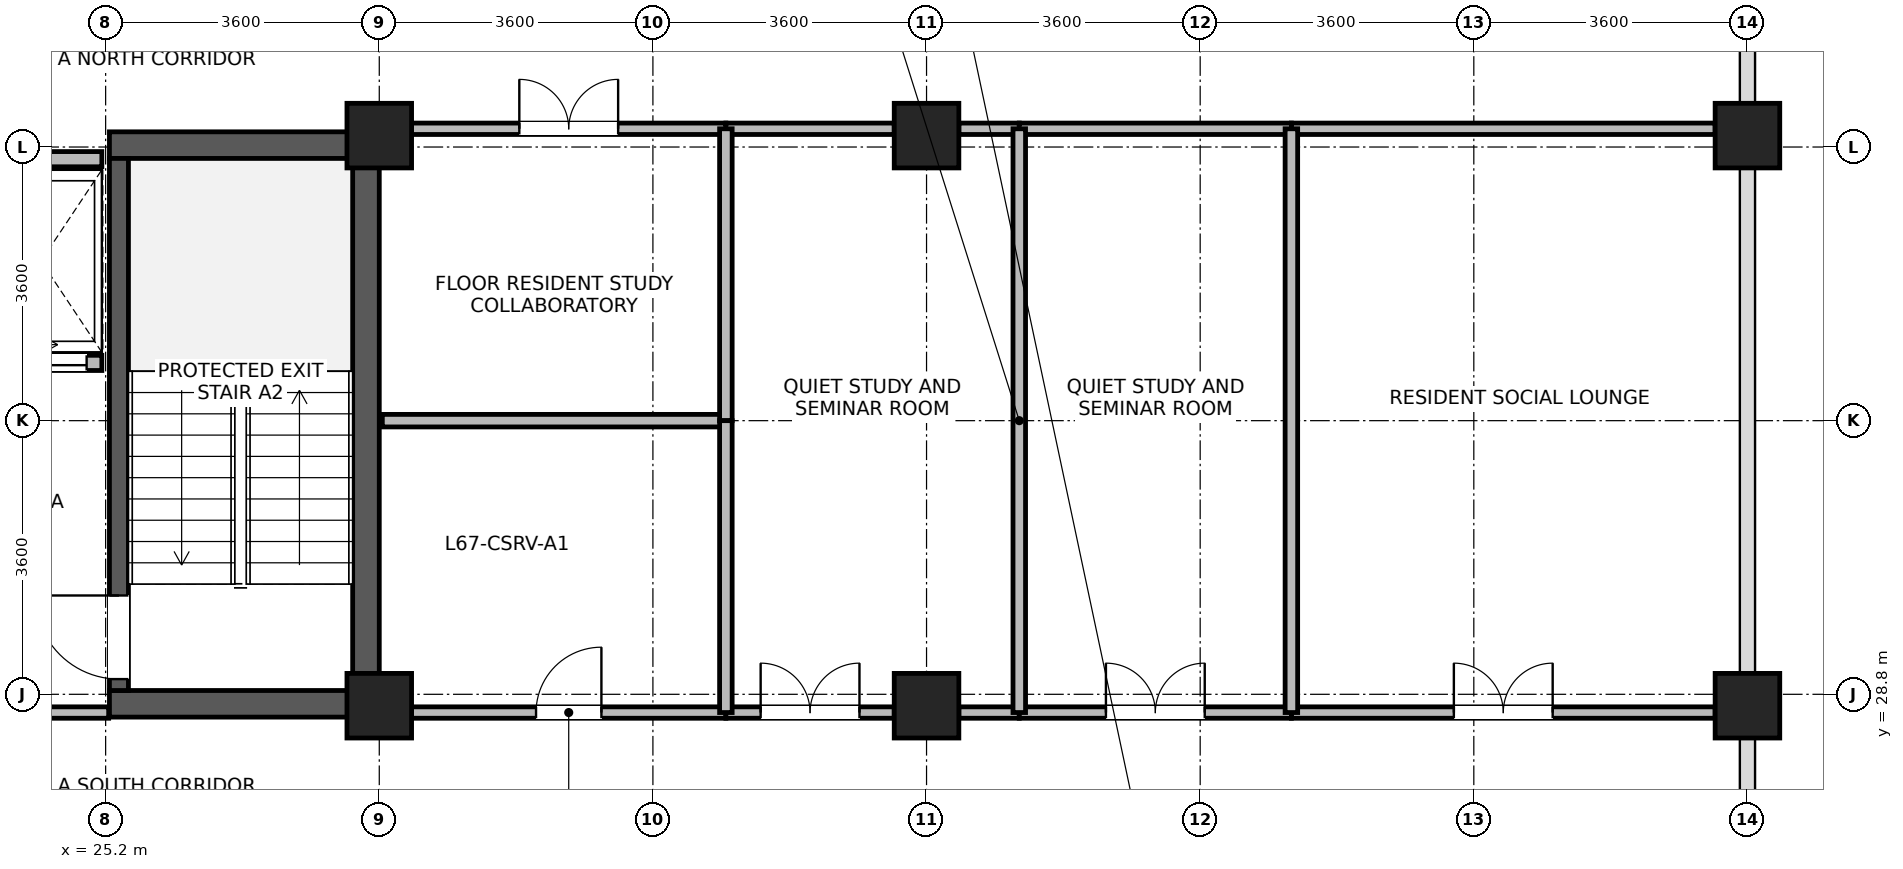
"""IFC4 building model, lengths in metres.
Left out: names, types, materials, properties, quantities, classifications, styles, units other than length and angle.
Written with IfcOpenShell. Run it as: python <this file> out.ifc"""

import sys

from ifc_helpers import new_model, si_unit, direction, frame, frame_2d, origin, origin_2d, place, context, subcontext, project, spatial, rectangle, extrude, source, transform, mapped, element, fill, save


model = new_model("IFC4")
c1 = context("Model", 3, precision=1e-05, world=origin(), true_north=direction((0.0, 1.0)))
c2 = subcontext(c1, "Body", "Model", "MODEL_VIEW")
j1 = project(units=[si_unit("LENGTHUNIT", "METRE"), si_unit("PLANEANGLEUNIT", "RADIAN")], contexts=[c1])
p1 = place(None, origin())
s1 = spatial("IfcSite", under=j1, at=p1, CompositionType="ELEMENT")
p2 = place(p1, origin())
s2 = spatial("IfcBuilding", under=s1, at=p2, CompositionType="ELEMENT")
p3 = place(p2, frame((0.0, 0.0, 261.0)))
s3 = spatial("IfcBuildingStorey", under=s2, at=p3, CompositionType="ELEMENT", Elevation=261.0)
p4 = place(p3, frame((28.625, 28.5, 0.0), z_axis=(0.0, 0.0, 1.0), x_axis=(0.0, 1.0, 0.0)))
e1 = element("IfcWall", 1, at=p4, inside=s3, PredefinedType="SHEAR", context=c2, shape_type="SweptSolid", body=[
    extrude(rectangle(XDim=7.7, YDim=0.35, at=frame_2d((3.85, 0.0))), origin(), (0.0, 0.0, 1.0), 3.475),
])
for number, where, z_axis, x_axis in (
    (2, (25.25, 28.675, 0.0), (0.0, 0.0, 1.0), (1.0, 0.0, 0.0)),
    (3, (25.25, 36.025, 0.0), (0.0, 0.0, 1.0), (1.0, 0.0, 0.0)),
):
    element("IfcWall", number, at=place(p3, frame(where, z_axis=z_axis, x_axis=x_axis)), inside=s3, PredefinedType="SHEAR", context=c2, shape_type="SweptSolid", body=[
        extrude(rectangle(XDim=3.2, YDim=0.35, at=frame_2d((1.6, 0.0))), origin(), (0.0, 0.0, 1.0), 3.475),
    ])
p5 = place(p3, frame((25.375, 28.85, 0.0), z_axis=(0.0, 0.0, 1.0), x_axis=(0.0, 1.0, 0.0)))
e4 = element("IfcWall", 4, at=p5, inside=s3, PredefinedType="SHEAR", context=c2, shape_type="SweptSolid", body=[
    extrude(rectangle(XDim=7.0, YDim=0.25, at=frame_2d((3.5, 0.0))), origin(), (0.0, 0.0, 1.0), 3.475),
])
p6 = place(p5, frame((0.15, 0.0, 0.0)))
e5 = element("IfcOpeningElement", 5, at=p6, cuts=e4, PredefinedType="OPENING", context=c2, shape_type="SweptSolid", body=[
    extrude(rectangle(XDim=1.1, YDim=2.08, at=frame_2d((0.55, 1.04))), frame((0.0, 0.135, 0.0), z_axis=(0.0, -1.0, 0.0), x_axis=(1.0, 0.0, 0.0)), (0.0, 0.0, 1.0), 0.27),
])
m1 = source(origin(), c2, "Body", "SweptSolid", [
    extrude(rectangle(XDim=0.85, YDim=0.85, at=origin_2d()), origin(), (0.0, 0.0, 1.0), 3.7),
])
for number, where, z_axis, x_axis in (
    (6, (28.8, 28.65, 0.0), (0.0, 0.0, 1.0), (1.0, 0.0, 0.0)),
    (7, (28.8, 36.15, 0.0), (0.0, 0.0, 1.0), (1.0, 0.0, 0.0)),
    (8, (36.0, 28.65, 0.0), (0.0, 0.0, 1.0), (1.0, 0.0, 0.0)),
    (9, (36.0, 36.15, 0.0), (0.0, 0.0, 1.0), (1.0, 0.0, 0.0)),
    (10, (46.8, 28.65, 0.0), (0.0, 0.0, 1.0), (1.0, 0.0, 0.0)),
    (11, (46.8, 36.15, 0.0), (0.0, 0.0, 1.0), (1.0, 0.0, 0.0)),
):
    element("IfcColumn", number, at=place(p3, frame(where, z_axis=z_axis, x_axis=x_axis)), inside=s3, PredefinedType="COLUMN", context=c2, shape_type="MappedRepresentation", body=[
        mapped(m1, transform((0.0, 0.0, 0.0), x_axis=(1.0, 0.0, 0.0), y_axis=(0.0, 1.0, 0.0), z_axis=(0.0, 0.0, 1.0), scale=1.0)),
    ])
p7 = place(p3, frame((23.55, 33.16, 0.0), z_axis=(0.0, 0.0, 1.0), x_axis=(1.0, 0.0, 0.0)))
e12 = element("IfcWall", 12, at=p7, inside=s3, PredefinedType="PARTITIONING", context=c2, shape_type="SweptSolid", body=[
    extrude(rectangle(XDim=1.6, YDim=0.2, at=frame_2d((0.8, 0.0))), origin(), (0.0, 0.0, 1.0), 3.455),
])
p8 = place(p7, frame((0.2, 0.0, 0.0)))
e13 = element("IfcOpeningElement", 13, at=p8, cuts=e12, PredefinedType="OPENING", context=c2, shape_type="SweptSolid", body=[
    extrude(rectangle(XDim=1.2, YDim=2.12, at=frame_2d((0.6, 1.06))), frame((0.0, 0.11, 0.0), z_axis=(0.0, -1.0, 0.0), x_axis=(1.0, 0.0, 0.0)), (0.0, 0.0, 1.0), 0.22),
])
p9 = place(p3, frame((23.55, 35.84, 0.0), z_axis=(0.0, 0.0, 1.0), x_axis=(1.0, 0.0, 0.0)))
e14 = element("IfcWall", 14, at=p9, inside=s3, PredefinedType="PARTITIONING", context=c2, shape_type="SweptSolid", body=[
    extrude(rectangle(XDim=1.6, YDim=0.2, at=frame_2d((0.8, 0.0))), origin(), (0.0, 0.0, 1.0), 2.555),
])
p10 = place(p3, frame((40.8, 28.56, 0.0), z_axis=(0.0, 0.0, 1.0), x_axis=(1.0, 0.0, 0.0)))
e15 = element("IfcWall", 15, at=p10, inside=s3, PredefinedType="PARTITIONING", context=c2, shape_type="SweptSolid", body=[
    extrude(rectangle(XDim=5.575, YDim=0.15, at=frame_2d((2.788, 0.0))), origin(), (0.0, 0.0, 1.0), 2.905),
])
p11 = place(p10, frame((2.137, 0.0, 0.0)))
e16 = element("IfcOpeningElement", 16, at=p11, cuts=e15, PredefinedType="OPENING", context=c2, shape_type="SweptSolid", body=[
    extrude(rectangle(XDim=1.3, YDim=2.12, at=frame_2d((0.65, 1.06))), frame((0.0, 0.085, 0.0), z_axis=(0.0, -1.0, 0.0), x_axis=(1.0, 0.0, 0.0)), (0.0, 0.0, 1.0), 0.17),
])
p12 = place(p3, frame((40.8, 36.24, 0.0), z_axis=(0.0, 0.0, 1.0), x_axis=(1.0, 0.0, 0.0)))
e17 = element("IfcWall", 17, at=p12, inside=s3, PredefinedType="PARTITIONING", context=c2, shape_type="SweptSolid", body=[
    extrude(rectangle(XDim=5.575, YDim=0.15, at=frame_2d((2.788, 0.0))), origin(), (0.0, 0.0, 1.0), 2.905),
])
p13 = place(p3, frame((29.225, 28.56, 0.0), z_axis=(0.0, 0.0, 1.0), x_axis=(1.0, 0.0, 0.0)))
e18 = element("IfcWall", 18, at=p13, inside=s3, PredefinedType="PARTITIONING", context=c2, shape_type="SweptSolid", body=[
    extrude(rectangle(XDim=4.135, YDim=0.15, at=frame_2d((2.067, 0.0))), origin(), (0.0, 0.0, 1.0), 2.905),
])
p14 = place(p13, frame((1.637, 0.0, 0.0)))
e19 = element("IfcOpeningElement", 19, at=p14, cuts=e18, PredefinedType="OPENING", context=c2, shape_type="SweptSolid", body=[
    extrude(rectangle(XDim=0.86, YDim=2.02, at=frame_2d((0.43, 1.01))), frame((0.0, 0.085, 0.0), z_axis=(0.0, -1.0, 0.0), x_axis=(1.0, 0.0, 0.0)), (0.0, 0.0, 1.0), 0.17),
])
p15 = place(p3, frame((29.225, 36.24, 0.0), z_axis=(0.0, 0.0, 1.0), x_axis=(1.0, 0.0, 0.0)))
e20 = element("IfcWall", 20, at=p15, inside=s3, PredefinedType="PARTITIONING", context=c2, shape_type="SweptSolid", body=[
    extrude(rectangle(XDim=4.135, YDim=0.15, at=frame_2d((2.067, 0.0))), origin(), (0.0, 0.0, 1.0), 2.905),
])
p16 = place(p15, frame((1.417, 0.0, 0.0)))
e21 = element("IfcOpeningElement", 21, at=p16, cuts=e20, PredefinedType="OPENING", context=c2, shape_type="SweptSolid", body=[
    extrude(rectangle(XDim=1.3, YDim=2.12, at=frame_2d((0.65, 1.06))), frame((0.0, 0.085, 0.0), z_axis=(0.0, -1.0, 0.0), x_axis=(1.0, 0.0, 0.0)), (0.0, 0.0, 1.0), 0.17),
])
p17 = place(p3, frame((33.36, 28.56, 0.0), z_axis=(0.0, 0.0, 1.0), x_axis=(1.0, 0.0, 0.0)))
e22 = element("IfcWall", 22, at=p17, inside=s3, PredefinedType="PARTITIONING", context=c2, shape_type="SweptSolid", body=[
    extrude(rectangle(XDim=2.215, YDim=0.15, at=frame_2d((1.107, 0.0))), origin(), (0.0, 0.0, 1.0), 2.905),
])
p18 = place(p17, frame((0.458, 0.0, 0.0)))
e23 = element("IfcOpeningElement", 23, at=p18, cuts=e22, PredefinedType="OPENING", context=c2, shape_type="SweptSolid", body=[
    extrude(rectangle(XDim=1.3, YDim=2.12, at=frame_2d((0.65, 1.06))), frame((0.0, 0.085, 0.0), z_axis=(0.0, -1.0, 0.0), x_axis=(1.0, 0.0, 0.0)), (0.0, 0.0, 1.0), 0.17),
])
p19 = place(p3, frame((36.425, 28.56, 0.0), z_axis=(0.0, 0.0, 1.0), x_axis=(1.0, 0.0, 0.0)))
e24 = element("IfcWall", 24, at=p19, inside=s3, PredefinedType="PARTITIONING", context=c2, shape_type="SweptSolid", body=[
    extrude(rectangle(XDim=0.795, YDim=0.15, at=frame_2d((0.397, 0.0))), origin(), (0.0, 0.0, 1.0), 2.905),
])
p20 = place(p3, frame((33.36, 36.24, 0.0), z_axis=(0.0, 0.0, 1.0), x_axis=(1.0, 0.0, 0.0)))
e25 = element("IfcWall", 25, at=p20, inside=s3, PredefinedType="PARTITIONING", context=c2, shape_type="SweptSolid", body=[
    extrude(rectangle(XDim=2.215, YDim=0.15, at=frame_2d((1.107, 0.0))), origin(), (0.0, 0.0, 1.0), 2.905),
])
p21 = place(p3, frame((36.425, 36.24, 0.0), z_axis=(0.0, 0.0, 1.0), x_axis=(1.0, 0.0, 0.0)))
e26 = element("IfcWall", 26, at=p21, inside=s3, PredefinedType="PARTITIONING", context=c2, shape_type="SweptSolid", body=[
    extrude(rectangle(XDim=0.795, YDim=0.15, at=frame_2d((0.397, 0.0))), origin(), (0.0, 0.0, 1.0), 2.905),
])
p22 = place(p3, frame((37.22, 28.56, 0.0), z_axis=(0.0, 0.0, 1.0), x_axis=(1.0, 0.0, 0.0)))
e27 = element("IfcWall", 27, at=p22, inside=s3, PredefinedType="PARTITIONING", context=c2, shape_type="SweptSolid", body=[
    extrude(rectangle(XDim=3.58, YDim=0.15, at=frame_2d((1.79, 0.0))), origin(), (0.0, 0.0, 1.0), 2.905),
])
p23 = place(p22, frame((1.14, 0.0, 0.0)))
e28 = element("IfcOpeningElement", 28, at=p23, cuts=e27, PredefinedType="OPENING", context=c2, shape_type="SweptSolid", body=[
    extrude(rectangle(XDim=1.3, YDim=2.12, at=frame_2d((0.65, 1.06))), frame((0.0, 0.085, 0.0), z_axis=(0.0, -1.0, 0.0), x_axis=(1.0, 0.0, 0.0)), (0.0, 0.0, 1.0), 0.17),
])
p24 = place(p3, frame((37.22, 36.24, 0.0), z_axis=(0.0, 0.0, 1.0), x_axis=(1.0, 0.0, 0.0)))
e29 = element("IfcWall", 29, at=p24, inside=s3, PredefinedType="PARTITIONING", context=c2, shape_type="SweptSolid", body=[
    extrude(rectangle(XDim=3.58, YDim=0.15, at=frame_2d((1.79, 0.0))), origin(), (0.0, 0.0, 1.0), 2.905),
])
for number, where, z_axis, x_axis in (
    (30, (37.22, 28.56, 0.0), (0.0, 0.0, 1.0), (0.0, 1.0, 0.0)),
    (31, (40.8, 28.56, 0.0), (0.0, 0.0, 1.0), (0.0, 1.0, 0.0)),
):
    element("IfcWall", number, at=place(p3, frame(where, z_axis=z_axis, x_axis=x_axis)), inside=s3, PredefinedType="PARTITIONING", context=c2, shape_type="SweptSolid", body=[
        extrude(rectangle(XDim=7.68, YDim=0.165, at=frame_2d((3.84, 0.0))), origin(), (0.0, 0.0, 1.0), 3.455),
    ])
p25 = place(p3, frame((28.84, 32.4, 0.0), z_axis=(0.0, 0.0, 1.0), x_axis=(1.0, 0.0, 0.0)))
e32 = element("IfcWall", 32, at=p25, inside=s3, PredefinedType="PARTITIONING", context=c2, shape_type="SweptSolid", body=[
    extrude(rectangle(XDim=4.52, YDim=0.165, at=frame_2d((2.26, 0.0))), origin(), (0.0, 0.0, 1.0), 3.455),
])
p26 = place(p3, frame((33.36, 32.4, 0.0), z_axis=(0.0, 0.0, 1.0), x_axis=(0.0, 1.0, 0.0)))
e33 = element("IfcWall", 33, at=p26, inside=s3, PredefinedType="PARTITIONING", context=c2, shape_type="SweptSolid", body=[
    extrude(rectangle(XDim=3.84, YDim=0.165, at=frame_2d((1.92, 0.0))), origin(), (0.0, 0.0, 1.0), 3.455),
])
p27 = place(p3, frame((33.36, 28.56, 0.0), z_axis=(0.0, 0.0, 1.0), x_axis=(0.0, 1.0, 0.0)))
e34 = element("IfcWall", 34, at=p27, inside=s3, PredefinedType="PARTITIONING", context=c2, shape_type="SweptSolid", body=[
    extrude(rectangle(XDim=3.84, YDim=0.165, at=frame_2d((1.92, 0.0))), origin(), (0.0, 0.0, 1.0), 3.455),
])
p28 = place(p3, frame((21.76, 28.56, 0.0), z_axis=(0.0, 0.0, 1.0), x_axis=(1.0, 0.0, 0.0)))
e35 = element("IfcWall", 35, at=p28, inside=s3, PredefinedType="PARTITIONING", context=c2, shape_type="SweptSolid", body=[
    extrude(rectangle(XDim=3.48, YDim=0.15, at=frame_2d((1.74, 0.0))), origin(), (0.0, 0.0, 1.0), 2.555),
])
p29 = place(p6, origin())
e36 = element("IfcDoor", 36, at=p29, inside=s3, OperationType="SINGLE_SWING_RIGHT", PredefinedType="DOOR", context=c2, shape_type="SweptSolid", body=[
    extrude(rectangle(XDim=1.1, YDim=2.08, at=frame_2d((0.55, 1.04))), frame((0.0, 0.025, 0.0), z_axis=(0.0, -1.0, 0.0), x_axis=(1.0, 0.0, 0.0)), (0.0, 0.0, 1.0), 0.05),
])
fill(e5, e36)
p30 = place(p8, origin())
e37 = element("IfcDoor", 37, at=p30, inside=s3, OperationType="SLIDING_TO_RIGHT", PredefinedType="DOOR", context=c2, shape_type="SweptSolid", body=[
    extrude(rectangle(XDim=1.2, YDim=2.12, at=frame_2d((0.6, 1.06))), frame((0.0, 0.025, 0.0), z_axis=(0.0, -1.0, 0.0), x_axis=(1.0, 0.0, 0.0)), (0.0, 0.0, 1.0), 0.05),
])
fill(e13, e37)
p31 = place(p11, origin())
e38 = element("IfcDoor", 38, at=p31, inside=s3, OperationType="DOUBLE_DOOR_SINGLE_SWING", PredefinedType="DOOR", context=c2, shape_type="SweptSolid", body=[
    extrude(rectangle(XDim=1.3, YDim=2.12, at=frame_2d((0.65, 1.06))), frame((0.0, 0.025, 0.0), z_axis=(0.0, -1.0, 0.0), x_axis=(1.0, 0.0, 0.0)), (0.0, 0.0, 1.0), 0.05),
])
fill(e16, e38)
p32 = place(p14, origin())
e39 = element("IfcDoor", 39, at=p32, inside=s3, OperationType="SINGLE_SWING_RIGHT", PredefinedType="DOOR", context=c2, shape_type="SweptSolid", body=[
    extrude(rectangle(XDim=0.86, YDim=2.02, at=frame_2d((0.43, 1.01))), frame((0.0, 0.025, 0.0), z_axis=(0.0, -1.0, 0.0), x_axis=(1.0, 0.0, 0.0)), (0.0, 0.0, 1.0), 0.05),
])
fill(e19, e39)
p33 = place(p16, origin())
e40 = element("IfcDoor", 40, at=p33, inside=s3, OperationType="DOUBLE_DOOR_SINGLE_SWING", PredefinedType="DOOR", context=c2, shape_type="SweptSolid", body=[
    extrude(rectangle(XDim=1.3, YDim=2.12, at=frame_2d((0.65, 1.06))), frame((0.0, 0.025, 0.0), z_axis=(0.0, -1.0, 0.0), x_axis=(1.0, 0.0, 0.0)), (0.0, 0.0, 1.0), 0.05),
])
fill(e21, e40)
p34 = place(p18, origin())
e41 = element("IfcDoor", 41, at=p34, inside=s3, OperationType="DOUBLE_DOOR_SINGLE_SWING", PredefinedType="DOOR", context=c2, shape_type="SweptSolid", body=[
    extrude(rectangle(XDim=1.3, YDim=2.12, at=frame_2d((0.65, 1.06))), frame((0.0, 0.025, 0.0), z_axis=(0.0, -1.0, 0.0), x_axis=(1.0, 0.0, 0.0)), (0.0, 0.0, 1.0), 0.05),
])
fill(e23, e41)
p35 = place(p23, origin())
e42 = element("IfcDoor", 42, at=p35, inside=s3, OperationType="DOUBLE_DOOR_SINGLE_SWING", PredefinedType="DOOR", context=c2, shape_type="SweptSolid", body=[
    extrude(rectangle(XDim=1.3, YDim=2.12, at=frame_2d((0.65, 1.06))), frame((0.0, 0.025, 0.0), z_axis=(0.0, -1.0, 0.0), x_axis=(1.0, 0.0, 0.0)), (0.0, 0.0, 1.0), 0.05),
])
fill(e28, e42)
save(model, sys.argv[1])
